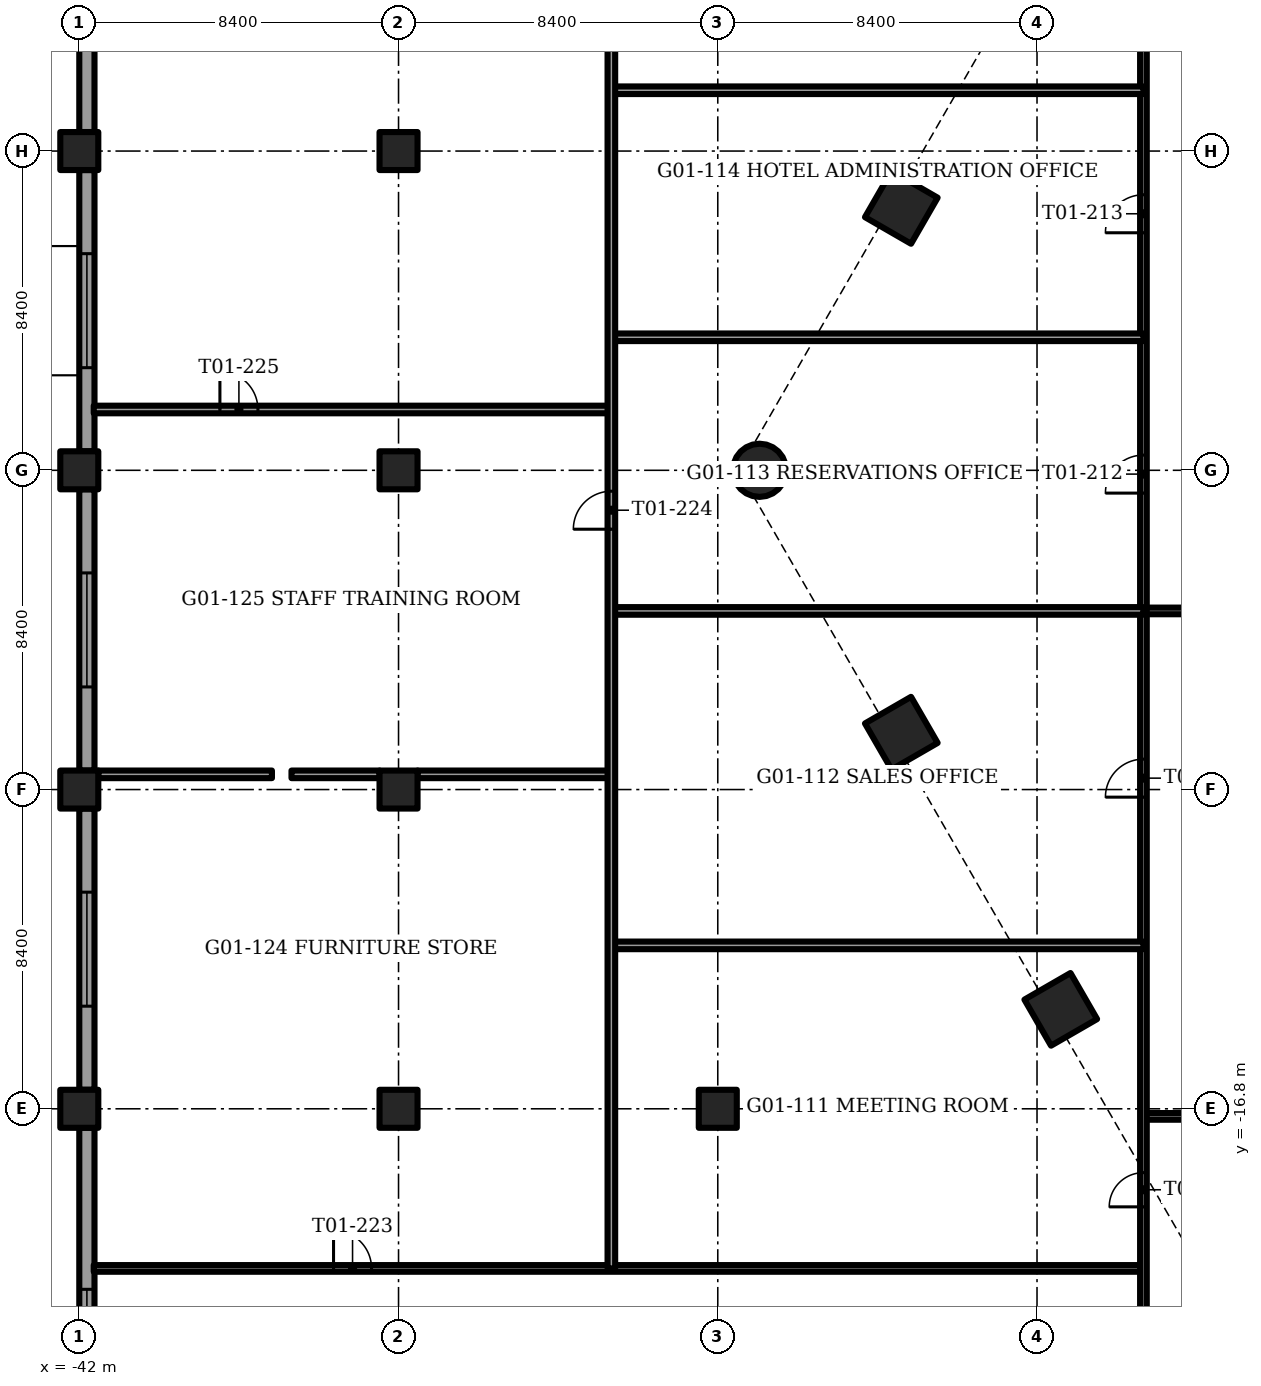
"""IFC4 building model, lengths in metres.
Left out: names, types, materials, properties, quantities, classifications, styles, units other than length and angle.
Written with IfcOpenShell. Run it as: python <this file> out.ifc"""

import sys

from ifc_helpers import new_model, si_unit, direction, frame, frame_2d, origin, origin_2d, place, context, subcontext, project, spatial, rectangle, circle, extrude, element, fill, save


model = new_model("IFC4")
c1 = context("Model", 3, precision=1e-05, world=origin(), true_north=direction((0.0, 1.0)))
c2 = subcontext(c1, "Body", "Model", "MODEL_VIEW")
j1 = project(units=[si_unit("LENGTHUNIT", "METRE"), si_unit("PLANEANGLEUNIT", "RADIAN")], contexts=[c1])
p1 = place(None, origin())
s1 = spatial("IfcSite", under=j1, at=p1, CompositionType="ELEMENT")
p2 = place(p1, origin())
s2 = spatial("IfcBuilding", under=s1, at=p2, CompositionType="ELEMENT")
p3 = place(p2, frame((0.0, 0.0, 6.0)))
s3 = spatial("IfcBuildingStorey", under=s2, at=p3, CompositionType="ELEMENT", Elevation=6.0)
for number, where, z_axis, x_axis in (
    (1, (-42.0, -16.8, -0.35), (0.0, 0.0, 1.0), (1.0, 0.0, 0.0)),
    (2, (-42.0, -8.4, -0.35), (0.0, 0.0, 1.0), (1.0, 0.0, 0.0)),
    (3, (-42.0, 0.0, -0.35), (0.0, 0.0, 1.0), (1.0, 0.0, 0.0)),
    (4, (-42.0, 8.4, -0.35), (0.0, 0.0, 1.0), (1.0, 0.0, 0.0)),
    (5, (-33.6, -16.8, -0.35), (0.0, 0.0, 1.0), (1.0, 0.0, 0.0)),
    (6, (-33.6, -8.4, -0.35), (0.0, 0.0, 1.0), (1.0, 0.0, 0.0)),
    (7, (-33.6, 0.0, -0.35), (0.0, 0.0, 1.0), (1.0, 0.0, 0.0)),
    (8, (-33.6, 8.4, -0.35), (0.0, 0.0, 1.0), (1.0, 0.0, 0.0)),
    (9, (-25.2, -16.8, -0.35), (0.0, 0.0, 1.0), (1.0, 0.0, 0.0)),
):
    element("IfcColumn", number, at=place(p3, frame(where, z_axis=z_axis, x_axis=x_axis)), inside=s3, PredefinedType="COLUMN", context=c2, shape_type="SweptSolid", body=[
        extrude(rectangle(XDim=1.0, YDim=1.0, at=origin_2d()), origin(), (0.0, 0.0, 1.0), 4.0),
    ])
p4 = place(p3, frame((-24.101, 0.0, -1.2), z_axis=(0.0, 0.0, 1.0), x_axis=(1.0, 0.0, 0.0)))
e10 = element("IfcColumn", 10, at=p4, inside=s3, PredefinedType="COLUMN", context=c2, shape_type="SweptSolid", body=[
    extrude(circle(Radius=0.7, at=origin_2d()), origin(), (0.0, 0.0, 1.0), 4.0),
])
for number, where, z_axis, x_axis in (
    (11, (-20.371, 6.917, -1.2), (0.0, 0.0, 1.0), (0.5, 0.866, 0.0)),
    (12, (-20.371, -6.917, -1.2), (0.0, 0.0, 1.0), (-0.5, 0.866, 0.0)),
    (13, (-16.175, -14.183, -1.2), (0.0, 0.0, 1.0), (-0.5, 0.866, 0.0)),
):
    element("IfcColumn", number, at=place(p3, frame(where, z_axis=z_axis, x_axis=x_axis)), inside=s3, PredefinedType="COLUMN", context=c2, shape_type="SweptSolid", body=[
        extrude(rectangle(XDim=1.4, YDim=1.4, at=origin_2d()), origin(), (0.0, 0.0, 1.0), 4.0),
    ])
p5 = place(p3, frame((-41.8, -28.8, 0.0), z_axis=(0.0, 0.0, 1.0), x_axis=(0.0, 1.0, 0.0)))
e14 = element("IfcWall", 14, at=p5, inside=s3, PredefinedType="SOLIDWALL", context=c2, shape_type="SweptSolid", body=[
    extrude(rectangle(XDim=11.5, YDim=0.4, at=frame_2d((5.75, 0.0))), origin(), (0.0, 0.0, 1.0), 3.65),
])
p6 = place(p5, frame((4.25, 0.0, 1.0)))
e15 = element("IfcOpeningElement", 15, at=p6, cuts=e14, PredefinedType="OPENING", context=c2, shape_type="SweptSolid", body=[
    extrude(rectangle(XDim=3.0, YDim=2.2, at=frame_2d((1.5, 1.1))), frame((0.0, 0.2, 0.0), z_axis=(0.0, -1.0, 0.0), x_axis=(1.0, 0.0, 0.0)), (0.0, 0.0, 1.0), 0.4),
])
p7 = place(p3, frame((-41.8, -16.3, 0.0), z_axis=(0.0, 0.0, 1.0), x_axis=(0.0, 1.0, 0.0)))
e16 = element("IfcWall", 16, at=p7, inside=s3, PredefinedType="SOLIDWALL", context=c2, shape_type="SweptSolid", body=[
    extrude(rectangle(XDim=7.4, YDim=0.4, at=frame_2d((3.7, 0.0))), origin(), (0.0, 0.0, 1.0), 3.65),
])
p8 = place(p7, frame((2.2, 0.0, 1.0)))
e17 = element("IfcOpeningElement", 17, at=p8, cuts=e16, PredefinedType="OPENING", context=c2, shape_type="SweptSolid", body=[
    extrude(rectangle(XDim=3.0, YDim=2.2, at=frame_2d((1.5, 1.1))), frame((0.0, 0.2, 0.0), z_axis=(0.0, -1.0, 0.0), x_axis=(1.0, 0.0, 0.0)), (0.0, 0.0, 1.0), 0.4),
])
p9 = place(p3, frame((-41.8, -7.9, 0.0), z_axis=(0.0, 0.0, 1.0), x_axis=(0.0, 1.0, 0.0)))
e18 = element("IfcWall", 18, at=p9, inside=s3, PredefinedType="SOLIDWALL", context=c2, shape_type="SweptSolid", body=[
    extrude(rectangle(XDim=7.4, YDim=0.4, at=frame_2d((3.7, 0.0))), origin(), (0.0, 0.0, 1.0), 3.65),
])
p10 = place(p9, frame((2.2, 0.0, 1.0)))
e19 = element("IfcOpeningElement", 19, at=p10, cuts=e18, PredefinedType="OPENING", context=c2, shape_type="SweptSolid", body=[
    extrude(rectangle(XDim=3.0, YDim=2.2, at=frame_2d((1.5, 1.1))), frame((0.0, 0.2, 0.0), z_axis=(0.0, -1.0, 0.0), x_axis=(1.0, 0.0, 0.0)), (0.0, 0.0, 1.0), 0.4),
])
p11 = place(p3, frame((-41.8, 0.5, 0.0), z_axis=(0.0, 0.0, 1.0), x_axis=(0.0, 1.0, 0.0)))
e20 = element("IfcWall", 20, at=p11, inside=s3, PredefinedType="SOLIDWALL", context=c2, shape_type="SweptSolid", body=[
    extrude(rectangle(XDim=7.4, YDim=0.4, at=frame_2d((3.7, 0.0))), origin(), (0.0, 0.0, 1.0), 3.65),
])
p12 = place(p11, frame((2.2, 0.0, 1.0)))
e21 = element("IfcOpeningElement", 21, at=p12, cuts=e20, PredefinedType="OPENING", context=c2, shape_type="SweptSolid", body=[
    extrude(rectangle(XDim=3.0, YDim=2.2, at=frame_2d((1.5, 1.1))), frame((0.0, 0.2, 0.0), z_axis=(0.0, -1.0, 0.0), x_axis=(1.0, 0.0, 0.0)), (0.0, 0.0, 1.0), 0.4),
])
p13 = place(p3, frame((-41.8, 8.9, 0.0), z_axis=(0.0, 0.0, 1.0), x_axis=(0.0, 1.0, 0.0)))
e22 = element("IfcWall", 22, at=p13, inside=s3, PredefinedType="SOLIDWALL", context=c2, shape_type="SweptSolid", body=[
    extrude(rectangle(XDim=7.4, YDim=0.4, at=frame_2d((3.7, 0.0))), origin(), (0.0, 0.0, 1.0), 3.65),
])
p14 = place(p13, frame((2.2, 0.0, 1.0)))
e23 = element("IfcOpeningElement", 23, at=p14, cuts=e22, PredefinedType="OPENING", context=c2, shape_type="SweptSolid", body=[
    extrude(rectangle(XDim=3.0, YDim=2.2, at=frame_2d((1.5, 1.1))), frame((0.0, 0.2, 0.0), z_axis=(0.0, -1.0, 0.0), x_axis=(1.0, 0.0, 0.0)), (0.0, 0.0, 1.0), 0.4),
])
p15 = place(p3, frame((-41.62, -21.0, 0.0), z_axis=(0.0, 0.0, 1.0), x_axis=(1.0, 0.0, 0.0)))
e24 = element("IfcWall", 24, at=p15, inside=s3, PredefinedType="PARTITIONING", context=c2, shape_type="SweptSolid", body=[
    extrude(rectangle(XDim=27.62, YDim=0.175, at=frame_2d((13.81, 0.0))), origin(), (0.0, 0.0, 1.0), 3.65),
])
p16 = place(p15, frame((6.31, 0.0, 0.0)))
e25 = element("IfcOpeningElement", 25, at=p16, cuts=e24, PredefinedType="OPENING", context=c2, shape_type="SweptSolid", body=[
    extrude(rectangle(XDim=1.0, YDim=2.1, at=frame_2d((0.5, 1.05))), frame((0.0, 0.087, 0.0), z_axis=(0.0, -1.0, 0.0), x_axis=(1.0, 0.0, 0.0)), (0.0, 0.0, 1.0), 0.175),
])
p17 = place(p3, frame((-14.0, -17.0, 0.0), z_axis=(0.0, 0.0, 1.0), x_axis=(1.0, 0.0, 0.0)))
e26 = element("IfcWall", 26, at=p17, inside=s3, PredefinedType="PARTITIONING", context=c2, shape_type="SweptSolid", body=[
    extrude(rectangle(XDim=16.0, YDim=0.175, at=frame_2d((8.0, 0.0))), origin(), (0.0, 0.0, 1.0), 3.65),
])
p18 = place(p3, frame((-14.0, -3.7, 0.0), z_axis=(0.0, 0.0, 1.0), x_axis=(1.0, 0.0, 0.0)))
e27 = element("IfcWall", 27, at=p18, inside=s3, PredefinedType="PARTITIONING", context=c2, shape_type="SweptSolid", body=[
    extrude(rectangle(XDim=4.62, YDim=0.175, at=frame_2d((2.31, 0.0))), origin(), (0.0, 0.0, 1.0), 3.65),
])
p19 = place(p3, frame((-14.0, -29.195, 0.0), z_axis=(0.0, 0.0, 1.0), x_axis=(0.0, 1.0, 0.0)))
e28 = element("IfcWall", 28, at=p19, inside=s3, PredefinedType="PARTITIONING", context=c2, shape_type="SweptSolid", body=[
    extrude(rectangle(XDim=45.995, YDim=0.175, at=frame_2d((22.998, 0.0))), origin(), (0.0, 0.0, 1.0), 2.8),
])
p20 = place(p19, frame((4.395, 0.0, 0.0)))
e29 = element("IfcOpeningElement", 29, at=p20, cuts=e28, PredefinedType="OPENING", context=c2, shape_type="SweptSolid", body=[
    extrude(rectangle(XDim=1.6, YDim=2.1, at=frame_2d((0.8, 1.05))), frame((0.0, 0.087, 0.0), z_axis=(0.0, -1.0, 0.0), x_axis=(1.0, 0.0, 0.0)), (0.0, 0.0, 1.0), 0.175),
])
p21 = place(p19, frame((9.815, 0.0, 0.0)))
e30 = element("IfcOpeningElement", 30, at=p21, cuts=e28, PredefinedType="OPENING", context=c2, shape_type="SweptSolid", body=[
    extrude(rectangle(XDim=0.9, YDim=2.1, at=frame_2d((0.45, 1.05))), frame((0.0, 0.087, 0.0), z_axis=(0.0, -1.0, 0.0), x_axis=(1.0, 0.0, 0.0)), (0.0, 0.0, 1.0), 0.175),
])
p22 = place(p19, frame((20.595, 0.0, 0.0)))
e31 = element("IfcOpeningElement", 31, at=p22, cuts=e28, PredefinedType="OPENING", context=c2, shape_type="SweptSolid", body=[
    extrude(rectangle(XDim=1.0, YDim=2.1, at=frame_2d((0.5, 1.05))), frame((0.0, 0.087, 0.0), z_axis=(0.0, -1.0, 0.0), x_axis=(1.0, 0.0, 0.0)), (0.0, 0.0, 1.0), 0.175),
])
p23 = place(p19, frame((28.595, 0.0, 0.0)))
e32 = element("IfcOpeningElement", 32, at=p23, cuts=e28, PredefinedType="OPENING", context=c2, shape_type="SweptSolid", body=[
    extrude(rectangle(XDim=1.0, YDim=2.1, at=frame_2d((0.5, 1.05))), frame((0.0, 0.087, 0.0), z_axis=(0.0, -1.0, 0.0), x_axis=(1.0, 0.0, 0.0)), (0.0, 0.0, 1.0), 0.175),
])
p24 = place(p19, frame((35.445, 0.0, 0.0)))
e33 = element("IfcOpeningElement", 33, at=p24, cuts=e28, PredefinedType="OPENING", context=c2, shape_type="SweptSolid", body=[
    extrude(rectangle(XDim=1.0, YDim=2.1, at=frame_2d((0.5, 1.05))), frame((0.0, 0.087, 0.0), z_axis=(0.0, -1.0, 0.0), x_axis=(1.0, 0.0, 0.0)), (0.0, 0.0, 1.0), 0.175),
])
p25 = place(p19, frame((41.628, 0.0, 0.0)))
e34 = element("IfcOpeningElement", 34, at=p25, cuts=e28, PredefinedType="OPENING", context=c2, shape_type="SweptSolid", body=[
    extrude(rectangle(XDim=1.0, YDim=2.1, at=frame_2d((0.5, 1.05))), frame((0.0, 0.087, 0.0), z_axis=(0.0, -1.0, 0.0), x_axis=(1.0, 0.0, 0.0)), (0.0, 0.0, 1.0), 0.175),
])
p26 = place(p3, frame((-28.0, -12.5, 0.0), z_axis=(0.0, 0.0, 1.0), x_axis=(1.0, 0.0, 0.0)))
e35 = element("IfcWall", 35, at=p26, inside=s3, PredefinedType="PARTITIONING", context=c2, shape_type="SweptSolid", body=[
    extrude(rectangle(XDim=14.0, YDim=0.2, at=frame_2d((7.0, 0.0))), origin(), (0.0, 0.0, 1.0), 2.8),
])
p27 = place(p3, frame((-41.5, -8.0, 0.0), z_axis=(0.0, 0.0, 1.0), x_axis=(1.0, 0.0, 0.0)))
e36 = element("IfcWall", 36, at=p27, inside=s3, PredefinedType="PARTITIONING", context=c2, shape_type="SweptSolid", body=[
    extrude(rectangle(XDim=4.569, YDim=0.2, at=frame_2d((2.284, 0.0))), origin(), (0.0, 0.0, 1.0), 3.65),
])
p28 = place(p3, frame((-36.417, -8.0, 0.0), z_axis=(0.0, 0.0, 1.0), x_axis=(1.0, 0.0, 0.0)))
e37 = element("IfcWall", 37, at=p28, inside=s3, PredefinedType="PARTITIONING", context=c2, shape_type="SweptSolid", body=[
    extrude(rectangle(XDim=2.316, YDim=0.2, at=frame_2d((1.158, 0.0))), origin(), (0.0, 0.0, 1.0), 3.65),
])
p29 = place(p3, frame((-33.1, -8.0, 0.0), z_axis=(0.0, 0.0, 1.0), x_axis=(1.0, 0.0, 0.0)))
e38 = element("IfcWall", 38, at=p29, inside=s3, PredefinedType="PARTITIONING", context=c2, shape_type="SweptSolid", body=[
    extrude(rectangle(XDim=5.1, YDim=0.2, at=frame_2d((2.55, 0.0))), origin(), (0.0, 0.0, 1.0), 3.65),
])
p30 = place(p3, frame((-28.0, -3.7, 0.0), z_axis=(0.0, 0.0, 1.0), x_axis=(1.0, 0.0, 0.0)))
e39 = element("IfcWall", 39, at=p30, inside=s3, PredefinedType="PARTITIONING", context=c2, shape_type="SweptSolid", body=[
    extrude(rectangle(XDim=14.0, YDim=0.2, at=frame_2d((7.0, 0.0))), origin(), (0.0, 0.0, 1.0), 2.8),
])
p31 = place(p3, frame((-41.62, 1.6, 0.0), z_axis=(0.0, 0.0, 1.0), x_axis=(1.0, 0.0, 0.0)))
e40 = element("IfcWall", 40, at=p31, inside=s3, PredefinedType="PARTITIONING", context=c2, shape_type="SweptSolid", body=[
    extrude(rectangle(XDim=13.62, YDim=0.2, at=frame_2d((6.81, 0.0))), origin(), (0.0, 0.0, 1.0), 3.65),
])
p32 = place(p31, frame((3.32, 0.0, 0.0)))
e41 = element("IfcOpeningElement", 41, at=p32, cuts=e40, PredefinedType="OPENING", context=c2, shape_type="SweptSolid", body=[
    extrude(rectangle(XDim=1.0, YDim=2.1, at=frame_2d((0.5, 1.05))), frame((0.0, 0.1, 0.0), z_axis=(0.0, -1.0, 0.0), x_axis=(1.0, 0.0, 0.0)), (0.0, 0.0, 1.0), 0.2),
])
for number, where, z_axis, x_axis in (
    (42, (-28.0, 3.5, 0.0), (0.0, 0.0, 1.0), (1.0, 0.0, 0.0)),
    (43, (-28.0, 10.0, 0.0), (0.0, 0.0, 1.0), (1.0, 0.0, 0.0)),
):
    element("IfcWall", number, at=place(p3, frame(where, z_axis=z_axis, x_axis=x_axis)), inside=s3, PredefinedType="PARTITIONING", context=c2, shape_type="SweptSolid", body=[
        extrude(rectangle(XDim=14.0, YDim=0.2, at=frame_2d((7.0, 0.0))), origin(), (0.0, 0.0, 1.0), 2.8),
    ])
p33 = place(p3, frame((-28.0, -21.0, 0.0), z_axis=(0.0, 0.0, 1.0), x_axis=(0.0, 1.0, 0.0)))
e44 = element("IfcWall", 44, at=p33, inside=s3, PredefinedType="PARTITIONING", context=c2, shape_type="SweptSolid", body=[
    extrude(rectangle(XDim=37.8, YDim=0.2, at=frame_2d((18.9, 0.0))), origin(), (0.0, 0.0, 1.0), 3.65),
])
p34 = place(p33, frame((19.45, 0.0, 0.0)))
e45 = element("IfcOpeningElement", 45, at=p34, cuts=e44, PredefinedType="OPENING", context=c2, shape_type="SweptSolid", body=[
    extrude(rectangle(XDim=1.0, YDim=2.1, at=frame_2d((0.5, 1.05))), frame((0.0, 0.1, 0.0), z_axis=(0.0, -1.0, 0.0), x_axis=(1.0, 0.0, 0.0)), (0.0, 0.0, 1.0), 0.2),
])
p35 = place(p6, origin())
e46 = element("IfcWindow", 46, at=p35, inside=s3, PartitioningType="SINGLE_PANEL", PredefinedType="WINDOW", context=c2, shape_type="SweptSolid", body=[
    extrude(rectangle(XDim=3.0, YDim=2.2, at=frame_2d((1.5, 1.1))), frame((0.0, 0.03, 0.0), z_axis=(0.0, -1.0, 0.0), x_axis=(1.0, 0.0, 0.0)), (0.0, 0.0, 1.0), 0.06),
])
fill(e15, e46)
p36 = place(p8, origin())
e47 = element("IfcWindow", 47, at=p36, inside=s3, PartitioningType="SINGLE_PANEL", PredefinedType="WINDOW", context=c2, shape_type="SweptSolid", body=[
    extrude(rectangle(XDim=3.0, YDim=2.2, at=frame_2d((1.5, 1.1))), frame((0.0, 0.03, 0.0), z_axis=(0.0, -1.0, 0.0), x_axis=(1.0, 0.0, 0.0)), (0.0, 0.0, 1.0), 0.06),
])
fill(e17, e47)
p37 = place(p10, origin())
e48 = element("IfcWindow", 48, at=p37, inside=s3, PartitioningType="SINGLE_PANEL", PredefinedType="WINDOW", context=c2, shape_type="SweptSolid", body=[
    extrude(rectangle(XDim=3.0, YDim=2.2, at=frame_2d((1.5, 1.1))), frame((0.0, 0.03, 0.0), z_axis=(0.0, -1.0, 0.0), x_axis=(1.0, 0.0, 0.0)), (0.0, 0.0, 1.0), 0.06),
])
fill(e19, e48)
p38 = place(p12, origin())
e49 = element("IfcWindow", 49, at=p38, inside=s3, PartitioningType="SINGLE_PANEL", PredefinedType="WINDOW", context=c2, shape_type="SweptSolid", body=[
    extrude(rectangle(XDim=3.0, YDim=2.2, at=frame_2d((1.5, 1.1))), frame((0.0, 0.03, 0.0), z_axis=(0.0, -1.0, 0.0), x_axis=(1.0, 0.0, 0.0)), (0.0, 0.0, 1.0), 0.06),
])
fill(e21, e49)
p39 = place(p21, origin())
e50 = element("IfcDoor", 50, at=p39, inside=s3, OperationType="SINGLE_SWING_RIGHT", PredefinedType="DOOR", context=c2, shape_type="SweptSolid", body=[
    extrude(rectangle(XDim=0.9, YDim=2.1, at=frame_2d((0.45, 1.05))), frame((0.0, 0.025, 0.0), z_axis=(0.0, -1.0, 0.0), x_axis=(1.0, 0.0, 0.0)), (0.0, 0.0, 1.0), 0.05),
])
fill(e30, e50)
p40 = place(p22, origin())
e51 = element("IfcDoor", 51, at=p40, inside=s3, OperationType="SINGLE_SWING_LEFT", PredefinedType="DOOR", context=c2, shape_type="SweptSolid", body=[
    extrude(rectangle(XDim=1.0, YDim=2.1, at=frame_2d((0.5, 1.05))), frame((0.0, 0.025, 0.0), z_axis=(0.0, -1.0, 0.0), x_axis=(1.0, 0.0, 0.0)), (0.0, 0.0, 1.0), 0.05),
])
fill(e31, e51)
p41 = place(p23, origin())
e52 = element("IfcDoor", 52, at=p41, inside=s3, OperationType="SINGLE_SWING_RIGHT", PredefinedType="DOOR", context=c2, shape_type="SweptSolid", body=[
    extrude(rectangle(XDim=1.0, YDim=2.1, at=frame_2d((0.5, 1.05))), frame((0.0, 0.025, 0.0), z_axis=(0.0, -1.0, 0.0), x_axis=(1.0, 0.0, 0.0)), (0.0, 0.0, 1.0), 0.05),
])
fill(e32, e52)
p42 = place(p24, origin())
e53 = element("IfcDoor", 53, at=p42, inside=s3, OperationType="SINGLE_SWING_LEFT", PredefinedType="DOOR", context=c2, shape_type="SweptSolid", body=[
    extrude(rectangle(XDim=1.0, YDim=2.1, at=frame_2d((0.5, 1.05))), frame((0.0, 0.025, 0.0), z_axis=(0.0, -1.0, 0.0), x_axis=(1.0, 0.0, 0.0)), (0.0, 0.0, 1.0), 0.05),
])
fill(e33, e53)
p43 = place(p16, origin())
e54 = element("IfcDoor", 54, at=p43, inside=s3, OperationType="SINGLE_SWING_LEFT", PredefinedType="DOOR", context=c2, shape_type="SweptSolid", body=[
    extrude(rectangle(XDim=1.0, YDim=2.1, at=frame_2d((0.5, 1.05))), frame((0.0, 0.025, 0.0), z_axis=(0.0, -1.0, 0.0), x_axis=(1.0, 0.0, 0.0)), (0.0, 0.0, 1.0), 0.05),
])
fill(e25, e54)
p44 = place(p34, origin())
e55 = element("IfcDoor", 55, at=p44, inside=s3, OperationType="SINGLE_SWING_RIGHT", PredefinedType="DOOR", context=c2, shape_type="SweptSolid", body=[
    extrude(rectangle(XDim=1.0, YDim=2.1, at=frame_2d((0.5, 1.05))), frame((0.0, 0.025, 0.0), z_axis=(0.0, -1.0, 0.0), x_axis=(1.0, 0.0, 0.0)), (0.0, 0.0, 1.0), 0.05),
])
fill(e45, e55)
p45 = place(p32, origin())
e56 = element("IfcDoor", 56, at=p45, inside=s3, OperationType="SINGLE_SWING_LEFT", PredefinedType="DOOR", context=c2, shape_type="SweptSolid", body=[
    extrude(rectangle(XDim=1.0, YDim=2.1, at=frame_2d((0.5, 1.05))), frame((0.0, 0.025, 0.0), z_axis=(0.0, -1.0, 0.0), x_axis=(1.0, 0.0, 0.0)), (0.0, 0.0, 1.0), 0.05),
])
fill(e41, e56)
save(model, sys.argv[1])
